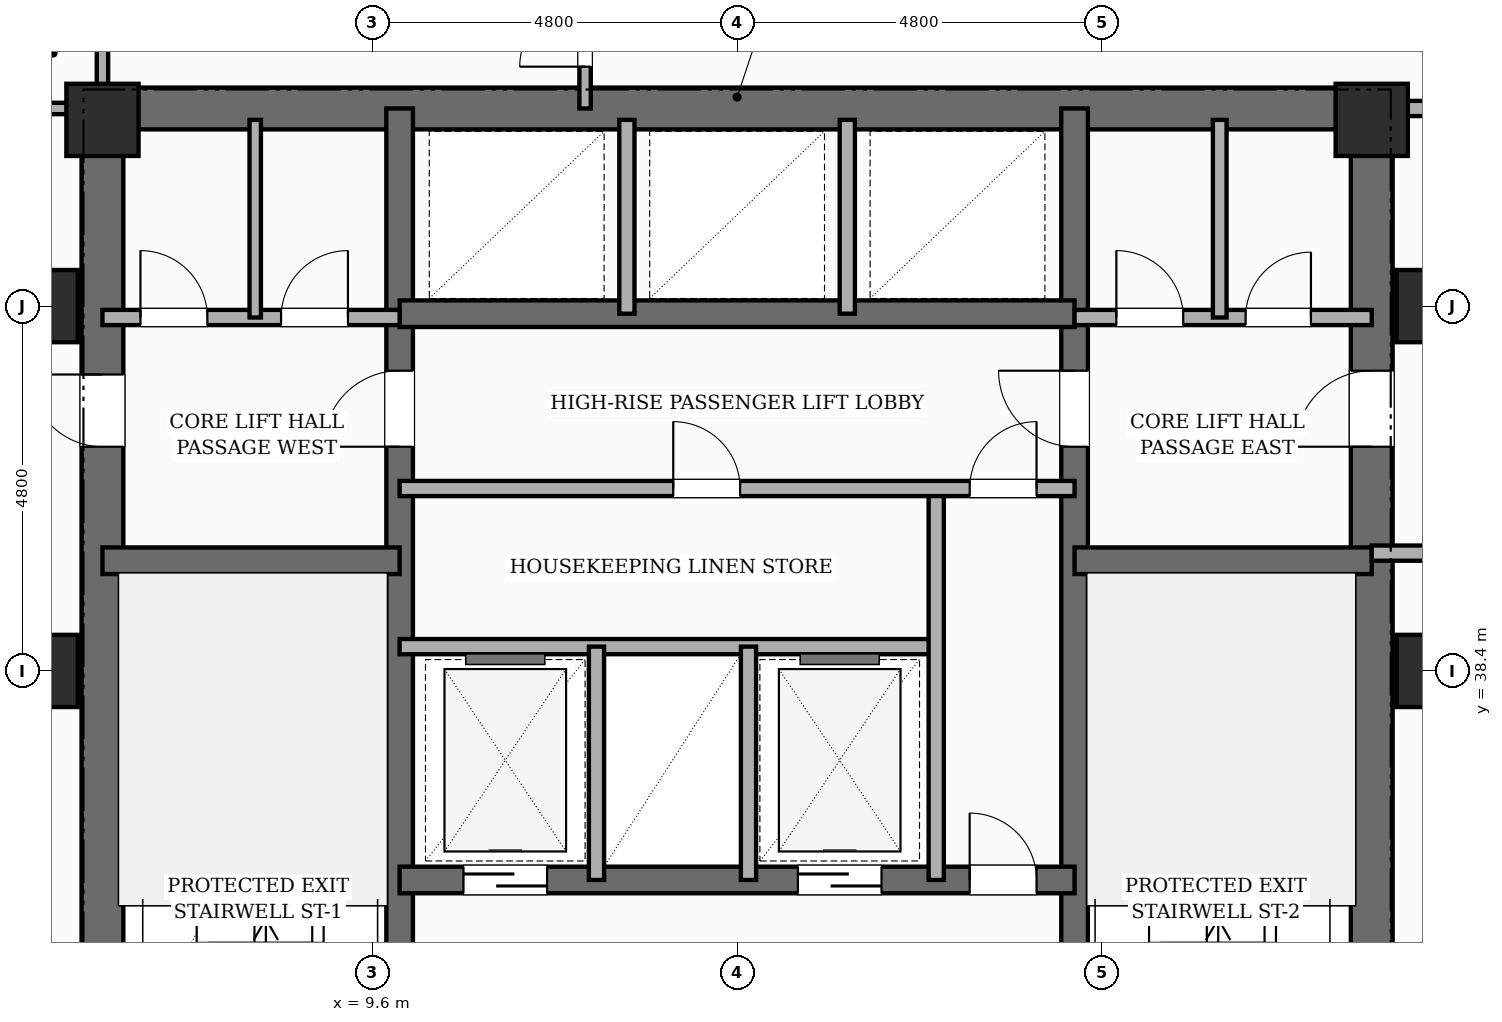
"""IFC4 building model, lengths in metres.
Left out: names, types, materials, properties, quantities, classifications, styles, units other than length and angle.
Written with IfcOpenShell. Run it as: python <this file> out.ifc"""

import sys

from ifc_helpers import new_model, si_unit, direction, frame, frame_2d, origin, origin_2d, place, context, subcontext, project, spatial, rectangle, extrude, element, fill, save


model = new_model("IFC4")
c1 = context("Model", 3, precision=1e-05, world=origin(), true_north=direction((0.0, 1.0)))
c2 = subcontext(c1, "Body", "Model", "MODEL_VIEW")
j1 = project(units=[si_unit("LENGTHUNIT", "METRE"), si_unit("PLANEANGLEUNIT", "RADIAN")], contexts=[c1])
p1 = place(None, origin())
s1 = spatial("IfcSite", under=j1, at=p1, CompositionType="ELEMENT")
p2 = place(p1, origin())
s2 = spatial("IfcBuilding", under=s1, at=p2, CompositionType="ELEMENT")
p3 = place(p2, frame((0.0, 0.0, 110.8)))
s3 = spatial("IfcBuildingStorey", under=s2, at=p3, CompositionType="ELEMENT", Elevation=110.8)
p4 = place(p3, frame((6.05, 30.625, 0.0), z_axis=(0.0, 0.0, 1.0), x_axis=(0.0, 1.0, 0.0)))
e1 = element("IfcWall", 1, at=p4, inside=s3, PredefinedType="SHEAR", context=c2, shape_type="SweptSolid", body=[
    extrude(rectangle(XDim=15.45, YDim=0.55, at=frame_2d((7.725, 0.0))), origin(), (0.0, 0.0, 1.0), 3.6),
])
p5 = place(p4, frame((10.725, 0.0, 0.0)))
e2 = element("IfcOpeningElement", 2, at=p5, cuts=e1, PredefinedType="OPENING", context=c2, shape_type="SweptSolid", body=[
    extrude(rectangle(XDim=0.95, YDim=2.15, at=frame_2d((0.475, 1.075))), frame((0.0, 0.285, 0.0), z_axis=(0.0, -1.0, 0.0), x_axis=(1.0, 0.0, 0.0)), (0.0, 0.0, 1.0), 0.57),
])
p6 = place(p3, frame((22.75, 30.625, 0.0), z_axis=(0.0, 0.0, 1.0), x_axis=(0.0, 1.0, 0.0)))
e3 = element("IfcWall", 3, at=p6, inside=s3, PredefinedType="SHEAR", context=c2, shape_type="SweptSolid", body=[
    extrude(rectangle(XDim=15.45, YDim=0.55, at=frame_2d((7.725, 0.0))), origin(), (0.0, 0.0, 1.0), 3.6),
])
p7 = place(p6, frame((10.725, 0.0, 0.0)))
e4 = element("IfcOpeningElement", 4, at=p7, cuts=e3, PredefinedType="OPENING", context=c2, shape_type="SweptSolid", body=[
    extrude(rectangle(XDim=1.0, YDim=2.15, at=frame_2d((0.5, 1.075))), frame((0.0, 0.285, 0.0), z_axis=(0.0, -1.0, 0.0), x_axis=(1.0, 0.0, 0.0)), (0.0, 0.0, 1.0), 0.57),
])
p8 = place(p3, frame((6.05, 45.8, 0.0), z_axis=(0.0, 0.0, 1.0), x_axis=(1.0, 0.0, 0.0)))
e5 = element("IfcWall", 5, at=p8, inside=s3, PredefinedType="SHEAR", context=c2, shape_type="SweptSolid", body=[
    extrude(rectangle(XDim=16.7, YDim=0.55, at=frame_2d((8.35, 0.0))), origin(), (0.0, 0.0, 1.0), 3.6),
])
p9 = place(p3, frame((9.96, 30.9, 0.0), z_axis=(0.0, 0.0, 1.0), x_axis=(0.0, 1.0, 0.0)))
e6 = element("IfcWall", 6, at=p9, inside=s3, PredefinedType="SHEAR", context=c2, shape_type="SweptSolid", body=[
    extrude(rectangle(XDim=14.9, YDim=0.35, at=frame_2d((7.45, 0.0))), origin(), (0.0, 0.0, 1.0), 3.6),
])
p10 = place(p9, frame((0.65, 0.0, 0.0)))
e7 = element("IfcOpeningElement", 7, at=p10, cuts=e6, PredefinedType="OPENING", context=c2, shape_type="SweptSolid", body=[
    extrude(rectangle(XDim=0.95, YDim=2.1, at=frame_2d((0.475, 1.05))), frame((0.0, 0.185, 0.0), z_axis=(0.0, -1.0, 0.0), x_axis=(1.0, 0.0, 0.0)), (0.0, 0.0, 1.0), 0.37),
])
p11 = place(p9, frame((10.45, 0.0, 0.0)))
e8 = element("IfcOpeningElement", 8, at=p11, cuts=e6, PredefinedType="OPENING", context=c2, shape_type="SweptSolid", body=[
    extrude(rectangle(XDim=1.0, YDim=2.15, at=frame_2d((0.5, 1.075))), frame((0.0, 0.185, 0.0), z_axis=(0.0, -1.0, 0.0), x_axis=(1.0, 0.0, 0.0)), (0.0, 0.0, 1.0), 0.37),
])
p12 = place(p3, frame((18.84, 30.9, 0.0), z_axis=(0.0, 0.0, 1.0), x_axis=(0.0, 1.0, 0.0)))
e9 = element("IfcWall", 9, at=p12, inside=s3, PredefinedType="SHEAR", context=c2, shape_type="SweptSolid", body=[
    extrude(rectangle(XDim=14.9, YDim=0.35, at=frame_2d((7.45, 0.0))), origin(), (0.0, 0.0, 1.0), 3.6),
])
p13 = place(p12, frame((0.65, 0.0, 0.0)))
e10 = element("IfcOpeningElement", 10, at=p13, cuts=e9, PredefinedType="OPENING", context=c2, shape_type="SweptSolid", body=[
    extrude(rectangle(XDim=0.95, YDim=2.1, at=frame_2d((0.475, 1.05))), frame((0.0, 0.185, 0.0), z_axis=(0.0, -1.0, 0.0), x_axis=(1.0, 0.0, 0.0)), (0.0, 0.0, 1.0), 0.37),
])
p14 = place(p12, frame((10.45, 0.0, 0.0)))
e11 = element("IfcOpeningElement", 11, at=p14, cuts=e9, PredefinedType="OPENING", context=c2, shape_type="SweptSolid", body=[
    extrude(rectangle(XDim=1.0, YDim=2.15, at=frame_2d((0.5, 1.075))), frame((0.0, 0.185, 0.0), z_axis=(0.0, -1.0, 0.0), x_axis=(1.0, 0.0, 0.0)), (0.0, 0.0, 1.0), 0.37),
])
for number, where, z_axis, x_axis in (
    (12, (6.05, 39.85, 0.0), (0.0, 0.0, 1.0), (1.0, 0.0, 0.0)),
    (13, (18.84, 39.85, 0.0), (0.0, 0.0, 1.0), (1.0, 0.0, 0.0)),
):
    element("IfcWall", number, at=place(p3, frame(where, z_axis=z_axis, x_axis=x_axis)), inside=s3, PredefinedType="SHEAR", context=c2, shape_type="SweptSolid", body=[
        extrude(rectangle(XDim=3.91, YDim=0.35, at=frame_2d((1.955, 0.0))), origin(), (0.0, 0.0, 1.0), 3.6),
    ])
p15 = place(p3, frame((9.96, 35.65, 0.0), z_axis=(0.0, 0.0, 1.0), x_axis=(1.0, 0.0, 0.0)))
e14 = element("IfcWall", 14, at=p15, inside=s3, PredefinedType="SHEAR", context=c2, shape_type="SweptSolid", body=[
    extrude(rectangle(XDim=8.88, YDim=0.35, at=frame_2d((4.44, 0.0))), origin(), (0.0, 0.0, 1.0), 3.6),
])
p16 = place(p15, frame((0.84, 0.0, 0.0)))
e15 = element("IfcOpeningElement", 15, at=p16, cuts=e14, PredefinedType="OPENING", context=c2, shape_type="SweptSolid", body=[
    extrude(rectangle(XDim=1.1, YDim=2.15, at=frame_2d((0.55, 1.075))), frame((0.0, 0.185, 0.0), z_axis=(0.0, -1.0, 0.0), x_axis=(1.0, 0.0, 0.0)), (0.0, 0.0, 1.0), 0.37),
])
p17 = place(p15, frame((5.24, 0.0, 0.0)))
e16 = element("IfcOpeningElement", 16, at=p17, cuts=e14, PredefinedType="OPENING", context=c2, shape_type="SweptSolid", body=[
    extrude(rectangle(XDim=1.1, YDim=2.15, at=frame_2d((0.55, 1.075))), frame((0.0, 0.185, 0.0), z_axis=(0.0, -1.0, 0.0), x_axis=(1.0, 0.0, 0.0)), (0.0, 0.0, 1.0), 0.37),
])
p18 = place(p15, frame((7.5, 0.0, 0.0)))
e17 = element("IfcOpeningElement", 17, at=p18, cuts=e14, PredefinedType="OPENING", context=c2, shape_type="SweptSolid", body=[
    extrude(rectangle(XDim=0.88, YDim=2.1, at=frame_2d((0.44, 1.05))), frame((0.0, 0.185, 0.0), z_axis=(0.0, -1.0, 0.0), x_axis=(1.0, 0.0, 0.0)), (0.0, 0.0, 1.0), 0.37),
])
p19 = place(p3, frame((9.96, 43.1, 0.0), z_axis=(0.0, 0.0, 1.0), x_axis=(1.0, 0.0, 0.0)))
e18 = element("IfcWall", 18, at=p19, inside=s3, PredefinedType="SHEAR", context=c2, shape_type="SweptSolid", body=[
    extrude(rectangle(XDim=8.88, YDim=0.35, at=frame_2d((4.44, 0.0))), origin(), (0.0, 0.0, 1.0), 3.6),
])
for number, where, z_axis, x_axis in (
    (19, (5.25, 38.4, 0.0), (0.0, 0.0, 1.0), (1.0, 0.0, 0.0)),
    (20, (5.25, 43.2, 0.0), (0.0, 0.0, 1.0), (1.0, 0.0, 0.0)),
    (21, (6.05, 45.65, 0.0), (0.0, 0.0, 1.0), (1.0, 0.0, 0.0)),
    (22, (22.75, 45.65, 0.0), (0.0, 0.0, 1.0), (1.0, 0.0, 0.0)),
    (23, (23.55, 38.4, 0.0), (0.0, 0.0, 1.0), (1.0, 0.0, 0.0)),
    (24, (23.55, 43.2, 0.0), (0.0, 0.0, 1.0), (1.0, 0.0, 0.0)),
):
    element("IfcColumn", number, at=place(p3, frame(where, z_axis=z_axis, x_axis=x_axis)), inside=s3, PredefinedType="COLUMN", context=c2, shape_type="SweptSolid", body=[
        extrude(rectangle(XDim=0.95, YDim=0.95, at=origin_2d()), origin(), (0.0, 0.0, 1.0), 3.6),
    ])
p20 = place(p3, frame((5.03, 46.16, 0.0), z_axis=(0.0, 0.0, 1.0), x_axis=(0.382650053678, 0.92389335771, 0.0)))
e25 = element("IfcWall", 25, at=p20, inside=s3, PredefinedType="STANDARD", context=c2, shape_type="SweptSolid", body=[
    extrude(rectangle(XDim=0.626, YDim=0.32, at=frame_2d((0.313, 0.0))), origin(), (0.0, 0.0, 1.0), 3.36),
])
p21 = place(p3, frame((9.96, 38.72, 0.0), z_axis=(0.0, 0.0, 1.0), x_axis=(1.0, 0.0, 0.0)))
e26 = element("IfcWall", 26, at=p21, inside=s3, PredefinedType="POLYGONAL", context=c2, shape_type="SweptSolid", body=[
    extrude(rectangle(XDim=7.06, YDim=0.2, at=frame_2d((3.53, 0.0))), origin(), (0.0, 0.0, 1.0), 3.36),
])
for number, where, z_axis, x_axis in (
    (27, (12.55, 35.65, 0.0), (0.0, 0.0, 1.0), (0.0, 1.0, 0.0)),
    (28, (14.55, 35.65, 0.0), (0.0, 0.0, 1.0), (0.0, 1.0, 0.0)),
):
    element("IfcWall", number, at=place(p3, frame(where, z_axis=z_axis, x_axis=x_axis)), inside=s3, PredefinedType="POLYGONAL", context=c2, shape_type="SweptSolid", body=[
        extrude(rectangle(XDim=3.07, YDim=0.2, at=frame_2d((1.535, 0.0))), origin(), (0.0, 0.0, 1.0), 3.36),
    ])
p22 = place(p3, frame((17.02, 35.65, 0.0), z_axis=(0.0, 0.0, 1.0), x_axis=(0.0, 1.0, 0.0)))
e29 = element("IfcWall", 29, at=p22, inside=s3, PredefinedType="POLYGONAL", context=c2, shape_type="SweptSolid", body=[
    extrude(rectangle(XDim=5.15, YDim=0.2, at=frame_2d((2.575, 0.0))), origin(), (0.0, 0.0, 1.0), 3.36),
])
p23 = place(p3, frame((9.96, 40.8, 0.0), z_axis=(0.0, 0.0, 1.0), x_axis=(1.0, 0.0, 0.0)))
e30 = element("IfcWall", 30, at=p23, inside=s3, PredefinedType="POLYGONAL", context=c2, shape_type="SweptSolid", body=[
    extrude(rectangle(XDim=8.88, YDim=0.2, at=frame_2d((4.44, 0.0))), origin(), (0.0, 0.0, 1.0), 3.36),
])
p24 = place(p23, frame((7.5, 0.0, 0.0)))
e31 = element("IfcOpeningElement", 31, at=p24, cuts=e30, PredefinedType="OPENING", context=c2, shape_type="SweptSolid", body=[
    extrude(rectangle(XDim=0.88, YDim=2.1, at=frame_2d((0.44, 1.05))), frame((0.0, 0.11, 0.0), z_axis=(0.0, -1.0, 0.0), x_axis=(1.0, 0.0, 0.0)), (0.0, 0.0, 1.0), 0.22),
])
p25 = place(p23, frame((3.6, 0.0, 0.0)))
e32 = element("IfcOpeningElement", 32, at=p25, cuts=e30, PredefinedType="OPENING", context=c2, shape_type="SweptSolid", body=[
    extrude(rectangle(XDim=0.88, YDim=2.1, at=frame_2d((0.44, 1.05))), frame((0.0, 0.11, 0.0), z_axis=(0.0, -1.0, 0.0), x_axis=(1.0, 0.0, 0.0)), (0.0, 0.0, 1.0), 0.22),
])
p26 = place(p3, frame((18.84, 43.05, 0.0), z_axis=(0.0, 0.0, 1.0), x_axis=(1.0, 0.0, 0.0)))
e33 = element("IfcWall", 33, at=p26, inside=s3, PredefinedType="POLYGONAL", context=c2, shape_type="SweptSolid", body=[
    extrude(rectangle(XDim=3.91, YDim=0.2, at=frame_2d((1.955, 0.0))), origin(), (0.0, 0.0, 1.0), 2.54),
])
p27 = place(p26, frame((0.55, 0.0, 0.0)))
e34 = element("IfcOpeningElement", 34, at=p27, cuts=e33, PredefinedType="OPENING", context=c2, shape_type="SweptSolid", body=[
    extrude(rectangle(XDim=0.88, YDim=2.1, at=frame_2d((0.44, 1.05))), frame((0.0, 0.11, 0.0), z_axis=(0.0, -1.0, 0.0), x_axis=(1.0, 0.0, 0.0)), (0.0, 0.0, 1.0), 0.22),
])
p28 = place(p26, frame((2.25, 0.0, 0.0)))
e35 = element("IfcOpeningElement", 35, at=p28, cuts=e33, PredefinedType="OPENING", context=c2, shape_type="SweptSolid", body=[
    extrude(rectangle(XDim=0.86, YDim=2.1, at=frame_2d((0.43, 1.05))), frame((0.0, 0.11, 0.0), z_axis=(0.0, -1.0, 0.0), x_axis=(1.0, 0.0, 0.0)), (0.0, 0.0, 1.0), 0.22),
])
p29 = place(p3, frame((6.05, 43.05, 0.0), z_axis=(0.0, 0.0, 1.0), x_axis=(1.0, 0.0, 0.0)))
e36 = element("IfcWall", 36, at=p29, inside=s3, PredefinedType="POLYGONAL", context=c2, shape_type="SweptSolid", body=[
    extrude(rectangle(XDim=3.91, YDim=0.2, at=frame_2d((1.955, 0.0))), origin(), (0.0, 0.0, 1.0), 2.54),
])
p30 = place(p29, frame((0.5, 0.0, 0.0)))
e37 = element("IfcOpeningElement", 37, at=p30, cuts=e36, PredefinedType="OPENING", context=c2, shape_type="SweptSolid", body=[
    extrude(rectangle(XDim=0.88, YDim=2.1, at=frame_2d((0.44, 1.05))), frame((0.0, 0.11, 0.0), z_axis=(0.0, -1.0, 0.0), x_axis=(1.0, 0.0, 0.0)), (0.0, 0.0, 1.0), 0.22),
])
p31 = place(p29, frame((2.35, 0.0, 0.0)))
e38 = element("IfcOpeningElement", 38, at=p31, cuts=e36, PredefinedType="OPENING", context=c2, shape_type="SweptSolid", body=[
    extrude(rectangle(XDim=0.88, YDim=2.1, at=frame_2d((0.44, 1.05))), frame((0.0, 0.11, 0.0), z_axis=(0.0, -1.0, 0.0), x_axis=(1.0, 0.0, 0.0)), (0.0, 0.0, 1.0), 0.22),
])
for number, where, z_axis, x_axis in (
    (39, (12.95, 43.1, 0.0), (0.0, 0.0, 1.0), (0.0, 1.0, 0.0)),
    (40, (15.85, 43.1, 0.0), (0.0, 0.0, 1.0), (0.0, 1.0, 0.0)),
):
    element("IfcWall", number, at=place(p3, frame(where, z_axis=z_axis, x_axis=x_axis)), inside=s3, PredefinedType="POLYGONAL", context=c2, shape_type="SweptSolid", body=[
        extrude(rectangle(XDim=2.55, YDim=0.2, at=frame_2d((1.275, 0.0))), origin(), (0.0, 0.0, 1.0), 3.36),
    ])
p32 = place(p3, frame((8.06, 43.05, 0.0), z_axis=(0.0, 0.0, 1.0), x_axis=(0.0, 1.0, 0.0)))
e41 = element("IfcWall", 41, at=p32, inside=s3, PredefinedType="PARTITIONING", context=c2, shape_type="SweptSolid", body=[
    extrude(rectangle(XDim=2.6, YDim=0.15, at=frame_2d((1.3, 0.0))), origin(), (0.0, 0.0, 1.0), 3.36),
])
p33 = place(p3, frame((20.75, 43.05, 0.0), z_axis=(0.0, 0.0, 1.0), x_axis=(0.0, 1.0, 0.0)))
e42 = element("IfcWall", 42, at=p33, inside=s3, PredefinedType="PLUMBINGWALL", context=c2, shape_type="SweptSolid", body=[
    extrude(rectangle(XDim=2.6, YDim=0.18, at=frame_2d((1.3, 0.0))), origin(), (0.0, 0.0, 1.0), 3.36),
])
p34 = place(p3, frame((5.16, 45.8, 0.0), z_axis=(0.0, 0.0, 1.0), x_axis=(1.0, 0.0, 0.0)))
e43 = element("IfcWall", 43, at=p34, inside=s3, PredefinedType="PARTITIONING", context=c2, shape_type="SweptSolid", body=[
    extrude(rectangle(XDim=0.89, YDim=0.15, at=frame_2d((0.445, 0.0))), origin(), (0.0, 0.0, 1.0), 3.36),
])
p35 = place(p3, frame((22.75, 45.8, 0.0), z_axis=(0.0, 0.0, 1.0), x_axis=(1.0, 0.0, 0.0)))
e44 = element("IfcWall", 44, at=p35, inside=s3, PredefinedType="PARTITIONING", context=c2, shape_type="SweptSolid", body=[
    extrude(rectangle(XDim=2.75, YDim=0.2, at=frame_2d((1.375, 0.0))), origin(), (0.0, 0.0, 1.0), 3.36),
])
p36 = place(p3, frame((6.05, 45.8, 0.0), z_axis=(0.0, 0.0, 1.0), x_axis=(0.0, 1.0, 0.0)))
e45 = element("IfcWall", 45, at=p36, inside=s3, PredefinedType="PARTITIONING", context=c2, shape_type="SweptSolid", body=[
    extrude(rectangle(XDim=1.46, YDim=0.15, at=frame_2d((0.73, 0.0))), origin(), (0.0, 0.0, 1.0), 3.36),
])
p37 = place(p3, frame((12.4, 45.8, 0.0), z_axis=(0.0, 0.0, 1.0), x_axis=(0.0, 1.0, 0.0)))
e46 = element("IfcWall", 46, at=p37, inside=s3, PredefinedType="PARTITIONING", context=c2, shape_type="SweptSolid", body=[
    extrude(rectangle(XDim=1.88, YDim=0.15, at=frame_2d((0.94, 0.0))), origin(), (0.0, 0.0, 1.0), 3.36),
])
p38 = place(p37, frame((0.55, 0.0, 0.0)))
e47 = element("IfcOpeningElement", 47, at=p38, cuts=e46, PredefinedType="OPENING", context=c2, shape_type="SweptSolid", body=[
    extrude(rectangle(XDim=0.86, YDim=2.1, at=frame_2d((0.43, 1.05))), frame((0.0, 0.085, 0.0), z_axis=(0.0, -1.0, 0.0), x_axis=(1.0, 0.0, 0.0)), (0.0, 0.0, 1.0), 0.17),
])
p39 = place(p3, frame((22.75, 39.95, 0.0), z_axis=(0.0, 0.0, 1.0), x_axis=(1.0, 0.0, 0.0)))
e48 = element("IfcWall", 48, at=p39, inside=s3, PredefinedType="PARTITIONING", context=c2, shape_type="SweptSolid", body=[
    extrude(rectangle(XDim=2.75, YDim=0.2, at=frame_2d((1.375, 0.0))), origin(), (0.0, 0.0, 1.0), 3.36),
])
p40 = place(p16, origin())
e49 = element("IfcDoor", 49, at=p40, inside=s3, OperationType="SLIDING_TO_LEFT", PredefinedType="DOOR", context=c2, shape_type="SweptSolid", body=[
    extrude(rectangle(XDim=1.1, YDim=2.15, at=frame_2d((0.55, 1.075))), frame((0.0, 0.025, 0.0), z_axis=(0.0, -1.0, 0.0), x_axis=(1.0, 0.0, 0.0)), (0.0, 0.0, 1.0), 0.05),
])
fill(e15, e49)
p41 = place(p17, origin())
e50 = element("IfcDoor", 50, at=p41, inside=s3, OperationType="SLIDING_TO_RIGHT", PredefinedType="DOOR", context=c2, shape_type="SweptSolid", body=[
    extrude(rectangle(XDim=1.1, YDim=2.15, at=frame_2d((0.55, 1.075))), frame((0.0, 0.025, 0.0), z_axis=(0.0, -1.0, 0.0), x_axis=(1.0, 0.0, 0.0)), (0.0, 0.0, 1.0), 0.05),
])
fill(e16, e50)
p42 = place(p18, origin())
e51 = element("IfcDoor", 51, at=p42, inside=s3, OperationType="SINGLE_SWING_LEFT", PredefinedType="DOOR", context=c2, shape_type="SweptSolid", body=[
    extrude(rectangle(XDim=0.88, YDim=2.1, at=frame_2d((0.44, 1.05))), frame((0.0, 0.025, 0.0), z_axis=(0.0, -1.0, 0.0), x_axis=(1.0, 0.0, 0.0)), (0.0, 0.0, 1.0), 0.05),
])
fill(e17, e51)
p43 = place(p24, origin())
e52 = element("IfcDoor", 52, at=p43, inside=s3, OperationType="SINGLE_SWING_RIGHT", PredefinedType="DOOR", context=c2, shape_type="SweptSolid", body=[
    extrude(rectangle(XDim=0.88, YDim=2.1, at=frame_2d((0.44, 1.05))), frame((0.0, 0.025, 0.0), z_axis=(0.0, -1.0, 0.0), x_axis=(1.0, 0.0, 0.0)), (0.0, 0.0, 1.0), 0.05),
])
fill(e31, e52)
p44 = place(p11, origin())
e53 = element("IfcDoor", 53, at=p44, inside=s3, OperationType="SINGLE_SWING_LEFT", PredefinedType="DOOR", context=c2, shape_type="SweptSolid", body=[
    extrude(rectangle(XDim=1.0, YDim=2.15, at=frame_2d((0.5, 1.075))), frame((0.0, 0.025, 0.0), z_axis=(0.0, -1.0, 0.0), x_axis=(1.0, 0.0, 0.0)), (0.0, 0.0, 1.0), 0.05),
])
fill(e8, e53)
p45 = place(p14, origin())
e54 = element("IfcDoor", 54, at=p45, inside=s3, OperationType="SINGLE_SWING_RIGHT", PredefinedType="DOOR", context=c2, shape_type="SweptSolid", body=[
    extrude(rectangle(XDim=1.0, YDim=2.15, at=frame_2d((0.5, 1.075))), frame((0.0, 0.025, 0.0), z_axis=(0.0, -1.0, 0.0), x_axis=(1.0, 0.0, 0.0)), (0.0, 0.0, 1.0), 0.05),
])
fill(e11, e54)
p46 = place(p7, origin())
e55 = element("IfcDoor", 55, at=p46, inside=s3, OperationType="SINGLE_SWING_LEFT", PredefinedType="DOOR", context=c2, shape_type="SweptSolid", body=[
    extrude(rectangle(XDim=1.0, YDim=2.15, at=frame_2d((0.5, 1.075))), frame((0.0, 0.025, 0.0), z_axis=(0.0, -1.0, 0.0), x_axis=(1.0, 0.0, 0.0)), (0.0, 0.0, 1.0), 0.05),
])
fill(e4, e55)
p47 = place(p5, origin())
e56 = element("IfcDoor", 56, at=p47, inside=s3, OperationType="SINGLE_SWING_RIGHT", PredefinedType="DOOR", context=c2, shape_type="SweptSolid", body=[
    extrude(rectangle(XDim=0.95, YDim=2.15, at=frame_2d((0.475, 1.075))), frame((0.0, 0.025, 0.0), z_axis=(0.0, -1.0, 0.0), x_axis=(1.0, 0.0, 0.0)), (0.0, 0.0, 1.0), 0.05),
])
fill(e2, e56)
p48 = place(p30, origin())
e57 = element("IfcDoor", 57, at=p48, inside=s3, OperationType="SINGLE_SWING_LEFT", PredefinedType="DOOR", context=c2, shape_type="SweptSolid", body=[
    extrude(rectangle(XDim=0.88, YDim=2.1, at=frame_2d((0.44, 1.05))), frame((0.0, 0.025, 0.0), z_axis=(0.0, -1.0, 0.0), x_axis=(1.0, 0.0, 0.0)), (0.0, 0.0, 1.0), 0.05),
])
fill(e37, e57)
p49 = place(p31, origin())
e58 = element("IfcDoor", 58, at=p49, inside=s3, OperationType="SINGLE_SWING_RIGHT", PredefinedType="DOOR", context=c2, shape_type="SweptSolid", body=[
    extrude(rectangle(XDim=0.88, YDim=2.1, at=frame_2d((0.44, 1.05))), frame((0.0, 0.025, 0.0), z_axis=(0.0, -1.0, 0.0), x_axis=(1.0, 0.0, 0.0)), (0.0, 0.0, 1.0), 0.05),
])
fill(e38, e58)
p50 = place(p25, origin())
e59 = element("IfcDoor", 59, at=p50, inside=s3, OperationType="SINGLE_SWING_LEFT", PredefinedType="DOOR", context=c2, shape_type="SweptSolid", body=[
    extrude(rectangle(XDim=0.88, YDim=2.1, at=frame_2d((0.44, 1.05))), frame((0.0, 0.025, 0.0), z_axis=(0.0, -1.0, 0.0), x_axis=(1.0, 0.0, 0.0)), (0.0, 0.0, 1.0), 0.05),
])
fill(e32, e59)
p51 = place(p27, origin())
e60 = element("IfcDoor", 60, at=p51, inside=s3, OperationType="SINGLE_SWING_LEFT", PredefinedType="DOOR", context=c2, shape_type="SweptSolid", body=[
    extrude(rectangle(XDim=0.88, YDim=2.1, at=frame_2d((0.44, 1.05))), frame((0.0, 0.025, 0.0), z_axis=(0.0, -1.0, 0.0), x_axis=(1.0, 0.0, 0.0)), (0.0, 0.0, 1.0), 0.05),
])
fill(e34, e60)
p52 = place(p28, origin())
e61 = element("IfcDoor", 61, at=p52, inside=s3, OperationType="SINGLE_SWING_RIGHT", PredefinedType="DOOR", context=c2, shape_type="SweptSolid", body=[
    extrude(rectangle(XDim=0.86, YDim=2.1, at=frame_2d((0.43, 1.05))), frame((0.0, 0.025, 0.0), z_axis=(0.0, -1.0, 0.0), x_axis=(1.0, 0.0, 0.0)), (0.0, 0.0, 1.0), 0.05),
])
fill(e35, e61)
p53 = place(p38, origin())
e62 = element("IfcDoor", 62, at=p53, inside=s3, OperationType="SINGLE_SWING_LEFT", PredefinedType="DOOR", context=c2, shape_type="SweptSolid", body=[
    extrude(rectangle(XDim=0.86, YDim=2.1, at=frame_2d((0.43, 1.05))), frame((0.0, 0.025, 0.0), z_axis=(0.0, -1.0, 0.0), x_axis=(1.0, 0.0, 0.0)), (0.0, 0.0, 1.0), 0.05),
])
fill(e47, e62)
save(model, sys.argv[1])
